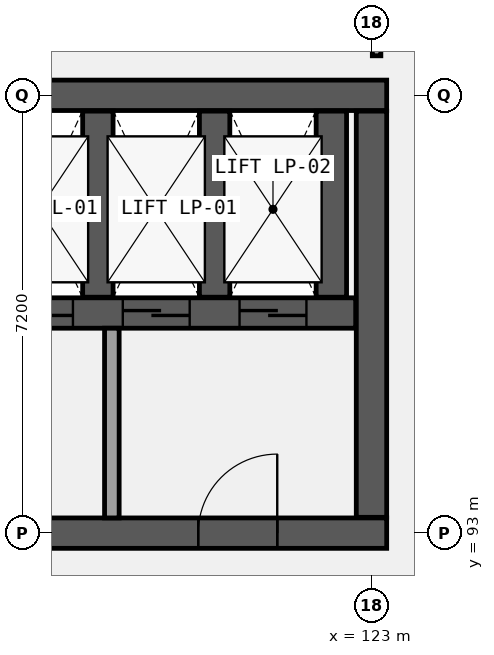
"""IFC4 building model, lengths in metres.
Left out: names, types, materials, properties, quantities, classifications, styles, units other than length and angle.
Written with IfcOpenShell. Run it as: python <this file> out.ifc"""

import sys

from ifc_helpers import new_model, si_unit, direction, frame, frame_2d, origin, place, context, subcontext, project, spatial, rectangle, extrude, element, fill, save


model = new_model("IFC4")
c1 = context("Model", 3, precision=1e-05, world=origin(), true_north=direction((0.0, 1.0)))
c2 = subcontext(c1, "Body", "Model", "MODEL_VIEW")
j1 = project(units=[si_unit("LENGTHUNIT", "METRE"), si_unit("PLANEANGLEUNIT", "RADIAN")], contexts=[c1])
p1 = place(None, origin())
s1 = spatial("IfcSite", under=j1, at=p1, CompositionType="ELEMENT")
p2 = place(p1, origin())
s2 = spatial("IfcBuilding", under=s1, at=p2, CompositionType="ELEMENT")
p3 = place(p2, frame((0.0, 0.0, -4.2)))
s3 = spatial("IfcBuildingStorey", under=s2, at=p3, CompositionType="ELEMENT", Elevation=-4.2)
p4 = place(p3, frame((108.35, 100.2, 0.0), z_axis=(0.0, 0.0, 1.0), x_axis=(1.0, 0.0, 0.0)))
e1 = element("IfcWall", 1, at=p4, inside=s3, PredefinedType="SHEAR", context=c2, shape_type="SweptSolid", body=[
    extrude(rectangle(XDim=14.9, YDim=0.5, at=frame_2d((7.45, 0.0))), origin(), (0.0, 0.0, 1.0), 4.2),
])
p5 = place(p3, frame((108.35, 93.0, 0.0), z_axis=(0.0, 0.0, 1.0), x_axis=(1.0, 0.0, 0.0)))
e2 = element("IfcWall", 2, at=p5, inside=s3, PredefinedType="SHEAR", context=c2, shape_type="SweptSolid", body=[
    extrude(rectangle(XDim=14.9, YDim=0.5, at=frame_2d((7.45, 0.0))), origin(), (0.0, 0.0, 1.0), 4.2),
])
p6 = place(p5, frame((3.8, 0.0, 0.0)))
e3 = element("IfcOpeningElement", 3, at=p6, cuts=e2, PredefinedType="OPENING", context=c2, shape_type="SweptSolid", body=[
    extrude(rectangle(XDim=1.3, YDim=2.2, at=frame_2d((0.65, 1.1))), frame((0.0, 0.26, 0.0), z_axis=(0.0, -1.0, 0.0), x_axis=(1.0, 0.0, 0.0)), (0.0, 0.0, 1.0), 0.52),
])
p7 = place(p5, frame((11.8, 0.0, 0.0)))
e4 = element("IfcOpeningElement", 4, at=p7, cuts=e2, PredefinedType="OPENING", context=c2, shape_type="SweptSolid", body=[
    extrude(rectangle(XDim=1.3, YDim=2.2, at=frame_2d((0.65, 1.1))), frame((0.0, 0.26, 0.0), z_axis=(0.0, -1.0, 0.0), x_axis=(1.0, 0.0, 0.0)), (0.0, 0.0, 1.0), 0.52),
])
p8 = place(p3, frame((123.0, 93.26, 0.0), z_axis=(0.0, 0.0, 1.0), x_axis=(0.0, 1.0, 0.0)))
e5 = element("IfcWall", 5, at=p8, inside=s3, PredefinedType="SHEAR", context=c2, shape_type="SweptSolid", body=[
    extrude(rectangle(XDim=6.68, YDim=0.5, at=frame_2d((3.34, 0.0))), origin(), (0.0, 0.0, 1.0), 4.2),
])
p9 = place(p3, frame((108.86, 96.62, 0.0), z_axis=(0.0, 0.0, 1.0), x_axis=(1.0, 0.0, 0.0)))
e6 = element("IfcWall", 6, at=p9, inside=s3, PredefinedType="SHEAR", context=c2, shape_type="SweptSolid", body=[
    extrude(rectangle(XDim=13.88, YDim=0.5, at=frame_2d((6.94, 0.0))), origin(), (0.0, 0.0, 1.0), 4.2),
])
p10 = place(p9, frame((8.13, 0.0, 0.0)))
e7 = element("IfcOpeningElement", 7, at=p10, cuts=e6, PredefinedType="OPENING", context=c2, shape_type="SweptSolid", body=[
    extrude(rectangle(XDim=1.1, YDim=2.15, at=frame_2d((0.55, 1.075))), frame((0.0, 0.26, 0.0), z_axis=(0.0, -1.0, 0.0), x_axis=(1.0, 0.0, 0.0)), (0.0, 0.0, 1.0), 0.52),
])
p11 = place(p9, frame((10.05, 0.0, 0.0)))
e8 = element("IfcOpeningElement", 8, at=p11, cuts=e6, PredefinedType="OPENING", context=c2, shape_type="SweptSolid", body=[
    extrude(rectangle(XDim=1.1, YDim=2.15, at=frame_2d((0.55, 1.075))), frame((0.0, 0.26, 0.0), z_axis=(0.0, -1.0, 0.0), x_axis=(1.0, 0.0, 0.0)), (0.0, 0.0, 1.0), 0.52),
])
p12 = place(p9, frame((11.97, 0.0, 0.0)))
e9 = element("IfcOpeningElement", 9, at=p12, cuts=e6, PredefinedType="OPENING", context=c2, shape_type="SweptSolid", body=[
    extrude(rectangle(XDim=1.1, YDim=2.15, at=frame_2d((0.55, 1.075))), frame((0.0, 0.26, 0.0), z_axis=(0.0, -1.0, 0.0), x_axis=(1.0, 0.0, 0.0)), (0.0, 0.0, 1.0), 0.52),
])
p13 = place(p9, frame((0.315, 0.0, 0.0)))
e10 = element("IfcOpeningElement", 10, at=p13, cuts=e6, PredefinedType="OPENING", context=c2, shape_type="SweptSolid", body=[
    extrude(rectangle(XDim=1.15, YDim=2.15, at=frame_2d((0.575, 1.075))), frame((0.0, 0.26, 0.0), z_axis=(0.0, -1.0, 0.0), x_axis=(1.0, 0.0, 0.0)), (0.0, 0.0, 1.0), 0.52),
])
for number, where, z_axis, x_axis in (
    (11, (118.5, 96.88, 0.0), (0.0, 0.0, 1.0), (0.0, 1.0, 0.0)),
    (12, (120.42, 96.88, 0.0), (0.0, 0.0, 1.0), (0.0, 1.0, 0.0)),
    (13, (122.34, 96.88, 0.0), (0.0, 0.0, 1.0), (0.0, 1.0, 0.0)),
):
    element("IfcWall", number, at=place(p3, frame(where, z_axis=z_axis, x_axis=x_axis)), inside=s3, PredefinedType="SHEAR", context=c2, shape_type="SweptSolid", body=[
        extrude(rectangle(XDim=3.06, YDim=0.5, at=frame_2d((1.53, 0.0))), origin(), (0.0, 0.0, 1.0), 4.2),
    ])
p14 = place(p3, frame((118.73, 93.25, 0.0), z_axis=(0.0, 0.0, 1.0), x_axis=(0.0, 1.0, 0.0)))
e14 = element("IfcWall", 14, at=p14, inside=s3, PredefinedType="SOLIDWALL", context=c2, shape_type="SweptSolid", body=[
    extrude(rectangle(XDim=3.12, YDim=0.24, at=frame_2d((1.56, 0.0))), origin(), (0.0, 0.0, 1.0), 3.85),
])
p15 = place(p3, frame((123.084, 100.85, 0.0), z_axis=(0.0, 0.0, 1.0), x_axis=(0.0, 1.0, 0.0)))
e15 = element("IfcWall", 15, at=p15, inside=s3, PredefinedType="PARTITIONING", context=c2, shape_type="SweptSolid", body=[
    extrude(rectangle(XDim=5.43, YDim=0.14, at=frame_2d((2.715, 0.0))), origin(), (0.0, 0.0, 1.0), 2.88),
])
p16 = place(p10, frame((1.1, 0.0, 0.0), z_axis=(0.0, 0.0, 1.0), x_axis=(-1.0, 0.0, 0.0)))
e16 = element("IfcDoor", 16, at=p16, inside=s3, OperationType="DOUBLE_DOOR_SLIDING", PredefinedType="DOOR", context=c2, shape_type="SweptSolid", body=[
    extrude(rectangle(XDim=1.1, YDim=2.15, at=frame_2d((0.55, 1.075))), frame((0.0, 0.025, 0.0), z_axis=(0.0, -1.0, 0.0), x_axis=(1.0, 0.0, 0.0)), (0.0, 0.0, 1.0), 0.05),
])
fill(e7, e16)
p17 = place(p11, frame((1.1, 0.0, 0.0), z_axis=(0.0, 0.0, 1.0), x_axis=(-1.0, 0.0, 0.0)))
e17 = element("IfcDoor", 17, at=p17, inside=s3, OperationType="DOUBLE_DOOR_SLIDING", PredefinedType="DOOR", context=c2, shape_type="SweptSolid", body=[
    extrude(rectangle(XDim=1.1, YDim=2.15, at=frame_2d((0.55, 1.075))), frame((0.0, 0.025, 0.0), z_axis=(0.0, -1.0, 0.0), x_axis=(1.0, 0.0, 0.0)), (0.0, 0.0, 1.0), 0.05),
])
fill(e8, e17)
p18 = place(p12, frame((1.1, 0.0, 0.0), z_axis=(0.0, 0.0, 1.0), x_axis=(-1.0, 0.0, 0.0)))
e18 = element("IfcDoor", 18, at=p18, inside=s3, OperationType="DOUBLE_DOOR_SLIDING", PredefinedType="DOOR", context=c2, shape_type="SweptSolid", body=[
    extrude(rectangle(XDim=1.1, YDim=2.15, at=frame_2d((0.55, 1.075))), frame((0.0, 0.025, 0.0), z_axis=(0.0, -1.0, 0.0), x_axis=(1.0, 0.0, 0.0)), (0.0, 0.0, 1.0), 0.05),
])
fill(e9, e18)
p19 = place(p7, frame((1.3, 0.0, 0.0), z_axis=(0.0, 0.0, 1.0), x_axis=(-1.0, 0.0, 0.0)))
e19 = element("IfcDoor", 19, at=p19, inside=s3, OperationType="SINGLE_SWING_RIGHT", PredefinedType="DOOR", context=c2, shape_type="SweptSolid", body=[
    extrude(rectangle(XDim=1.3, YDim=2.2, at=frame_2d((0.65, 1.1))), frame((0.0, 0.025, 0.0), z_axis=(0.0, -1.0, 0.0), x_axis=(1.0, 0.0, 0.0)), (0.0, 0.0, 1.0), 0.05),
])
fill(e4, e19)
save(model, sys.argv[1])
